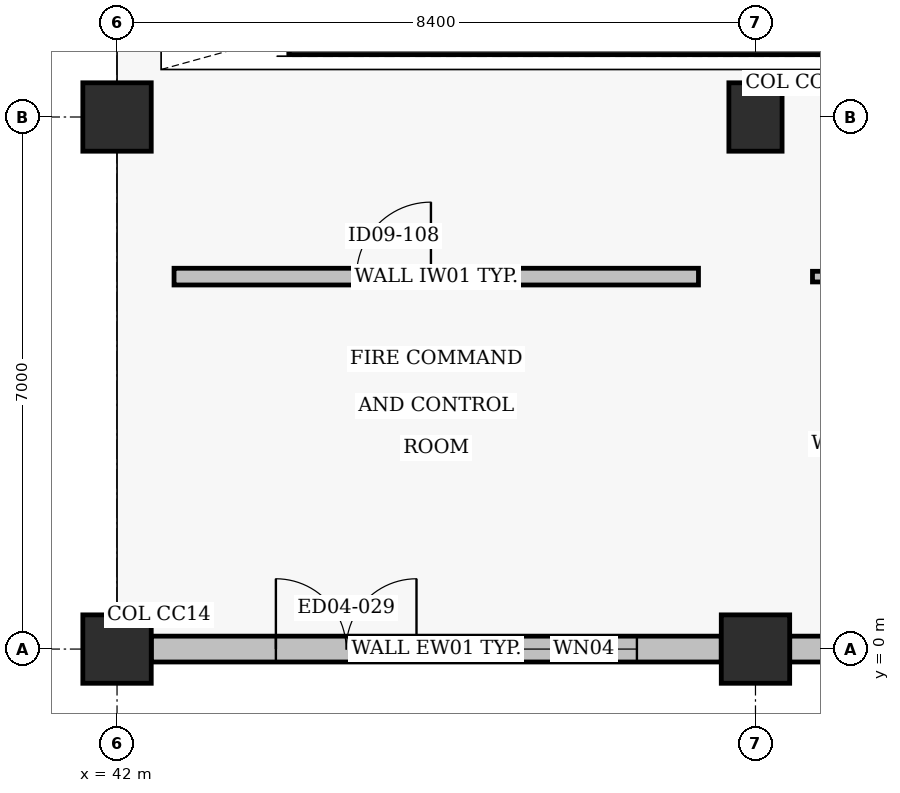
"""IFC4 building model, lengths in metres.
Left out: names, types, materials, properties, quantities, classifications, styles, units other than length and angle.
Written with IfcOpenShell. Run it as: python <this file> out.ifc"""

import sys

from ifc_helpers import new_model, si_unit, direction, frame, frame_2d, origin, origin_2d, place, context, subcontext, project, spatial, rectangle, extrude, element, fill, save


model = new_model("IFC4")
c1 = context("Model", 3, precision=1e-05, world=origin(), true_north=direction((0.0, 1.0)))
c2 = subcontext(c1, "Body", "Model", "MODEL_VIEW")
j1 = project(units=[si_unit("LENGTHUNIT", "METRE"), si_unit("PLANEANGLEUNIT", "RADIAN")], contexts=[c1])
p1 = place(None, origin())
s1 = spatial("IfcSite", under=j1, at=p1, CompositionType="ELEMENT")
p2 = place(p1, origin())
s2 = spatial("IfcBuilding", under=s1, at=p2, CompositionType="ELEMENT")
p3 = place(p2, origin())
s3 = spatial("IfcBuildingStorey", under=s2, at=p3, CompositionType="ELEMENT", Elevation=0.0)
for number, where, z_axis, x_axis in (
    (1, (42.0, 0.0, -0.46), (0.0, 0.0, 1.0), (1.0, 0.0, 0.0)),
    (2, (42.0, 7.0, -0.46), (0.0, 0.0, 1.0), (1.0, 0.0, 0.0)),
    (3, (50.4, 0.0, -0.46), (0.0, 0.0, 1.0), (1.0, 0.0, 0.0)),
):
    element("IfcColumn", number, at=place(p3, frame(where, z_axis=z_axis, x_axis=x_axis)), inside=s3, PredefinedType="COLUMN", context=c2, shape_type="SweptSolid", body=[
        extrude(rectangle(XDim=0.9, YDim=0.9, at=origin_2d()), origin(), (0.0, 0.0, 1.0), 5.9),
    ])
p4 = place(p3, frame((50.4, 7.0, -0.46), z_axis=(0.0, 0.0, 1.0), x_axis=(1.0, 0.0, 0.0)))
e4 = element("IfcColumn", 4, at=p4, inside=s3, PredefinedType="COLUMN", context=c2, shape_type="SweptSolid", body=[
    extrude(rectangle(XDim=0.7, YDim=0.9, at=origin_2d()), origin(), (0.0, 0.0, 1.0), 5.9),
])
p5 = place(p3, frame((42.45, 0.0, 0.0), z_axis=(0.0, 0.0, 1.0), x_axis=(1.0, 0.0, 0.0)))
e5 = element("IfcWall", 5, at=p5, inside=s3, PredefinedType="SOLIDWALL", context=c2, shape_type="SweptSolid", body=[
    extrude(rectangle(XDim=7.5, YDim=0.34, at=frame_2d((3.75, 0.0))), origin(), (0.0, 0.0, 1.0), 4.625),
])
p6 = place(p5, frame((1.64, 0.0, 0.0)))
e6 = element("IfcOpeningElement", 6, at=p6, cuts=e5, PredefinedType="OPENING", context=c2, shape_type="SweptSolid", body=[
    extrude(rectangle(XDim=1.85, YDim=2.2, at=frame_2d((0.925, 1.1))), frame((0.0, 0.18, 0.0), z_axis=(0.0, -1.0, 0.0), x_axis=(1.0, 0.0, 0.0)), (0.0, 0.0, 1.0), 0.36),
])
p7 = place(p5, frame((4.39, 0.0, 1.05)))
e7 = element("IfcOpeningElement", 7, at=p7, cuts=e5, PredefinedType="OPENING", context=c2, shape_type="SweptSolid", body=[
    extrude(rectangle(XDim=2.0, YDim=1.45, at=frame_2d((1.0, 0.725))), frame((0.0, 0.18, 0.0), z_axis=(0.0, -1.0, 0.0), x_axis=(1.0, 0.0, 0.0)), (0.0, 0.0, 1.0), 0.36),
])
p8 = place(p3, frame((50.85, 0.0, 0.0), z_axis=(0.0, 0.0, 1.0), x_axis=(1.0, 0.0, 0.0)))
e8 = element("IfcWall", 8, at=p8, inside=s3, PredefinedType="SOLIDWALL", context=c2, shape_type="SweptSolid", body=[
    extrude(rectangle(XDim=7.5, YDim=0.34, at=frame_2d((3.75, 0.0))), origin(), (0.0, 0.0, 1.0), 4.625),
])
p9 = place(p8, frame((2.89, 0.0, 1.05)))
e9 = element("IfcOpeningElement", 9, at=p9, cuts=e8, PredefinedType="OPENING", context=c2, shape_type="SweptSolid", body=[
    extrude(rectangle(XDim=1.8, YDim=1.5, at=frame_2d((0.9, 0.75))), frame((0.0, 0.18, 0.0), z_axis=(0.0, -1.0, 0.0), x_axis=(1.0, 0.0, 0.0)), (0.0, 0.0, 1.0), 0.36),
])
p10 = place(p3, frame((44.26, 7.96, 0.0), z_axis=(0.0, 0.0, 1.0), x_axis=(1.0, 0.0, 0.0)))
e10 = element("IfcWall", 10, at=p10, inside=s3, PredefinedType="SHEAR", context=c2, shape_type="SweptSolid", body=[
    extrude(rectangle(XDim=8.88, YDim=0.28, at=frame_2d((4.44, 0.0))), origin(), (0.0, 0.0, 1.0), 5.44),
])
p11 = place(p3, frame((42.75, 4.9, 0.0), z_axis=(0.0, 0.0, 1.0), x_axis=(1.0, 0.0, 0.0)))
e11 = element("IfcWall", 11, at=p11, inside=s3, PredefinedType="SOLIDWALL", context=c2, shape_type="SweptSolid", body=[
    extrude(rectangle(XDim=6.9, YDim=0.22, at=frame_2d((3.45, 0.0))), origin(), (0.0, 0.0, 1.0), 2.55),
])
p12 = place(p11, frame((2.4, 0.0, 0.0)))
e12 = element("IfcOpeningElement", 12, at=p12, cuts=e11, PredefinedType="OPENING", context=c2, shape_type="SweptSolid", body=[
    extrude(rectangle(XDim=0.98, YDim=2.12, at=frame_2d((0.49, 1.06))), frame((0.0, 0.12, 0.0), z_axis=(0.0, -1.0, 0.0), x_axis=(1.0, 0.0, 0.0)), (0.0, 0.0, 1.0), 0.24),
])
p13 = place(p3, frame((51.15, 4.9, 0.0), z_axis=(0.0, 0.0, 1.0), x_axis=(1.0, 0.0, 0.0)))
e13 = element("IfcWall", 13, at=p13, inside=s3, PredefinedType="PARTITIONING", context=c2, shape_type="SweptSolid", body=[
    extrude(rectangle(XDim=6.9, YDim=0.14, at=frame_2d((3.45, 0.0))), origin(), (0.0, 0.0, 1.0), 2.55),
])
p14 = place(p13, frame((2.4, 0.0, 0.0)))
e14 = element("IfcOpeningElement", 14, at=p14, cuts=e13, PredefinedType="OPENING", context=c2, shape_type="SweptSolid", body=[
    extrude(rectangle(XDim=1.04, YDim=2.14, at=frame_2d((0.52, 1.07))), frame((0.0, 0.08, 0.0), z_axis=(0.0, -1.0, 0.0), x_axis=(1.0, 0.0, 0.0)), (0.0, 0.0, 1.0), 0.16),
])
p15 = place(p6, origin())
e15 = element("IfcDoor", 15, at=p15, inside=s3, OperationType="DOUBLE_DOOR_SINGLE_SWING", PredefinedType="DOOR", context=c2, shape_type="SweptSolid", body=[
    extrude(rectangle(XDim=1.85, YDim=2.2, at=frame_2d((0.925, 1.1))), frame((0.0, 0.025, 0.0), z_axis=(0.0, -1.0, 0.0), x_axis=(1.0, 0.0, 0.0)), (0.0, 0.0, 1.0), 0.05),
])
fill(e6, e15)
p16 = place(p7, origin())
e16 = element("IfcWindow", 16, at=p16, inside=s3, PartitioningType="DOUBLE_PANEL_VERTICAL", PredefinedType="WINDOW", context=c2, shape_type="SweptSolid", body=[
    extrude(rectangle(XDim=2.0, YDim=1.45, at=frame_2d((1.0, 0.725))), frame((0.0, 0.03, 0.0), z_axis=(0.0, -1.0, 0.0), x_axis=(1.0, 0.0, 0.0)), (0.0, 0.0, 1.0), 0.06),
])
fill(e7, e16)
p17 = place(p12, origin())
e17 = element("IfcDoor", 17, at=p17, inside=s3, OperationType="SINGLE_SWING_RIGHT", PredefinedType="DOOR", context=c2, shape_type="SweptSolid", body=[
    extrude(rectangle(XDim=0.98, YDim=2.12, at=frame_2d((0.49, 1.06))), frame((0.0, 0.025, 0.0), z_axis=(0.0, -1.0, 0.0), x_axis=(1.0, 0.0, 0.0)), (0.0, 0.0, 1.0), 0.05),
])
fill(e12, e17)
save(model, sys.argv[1])
